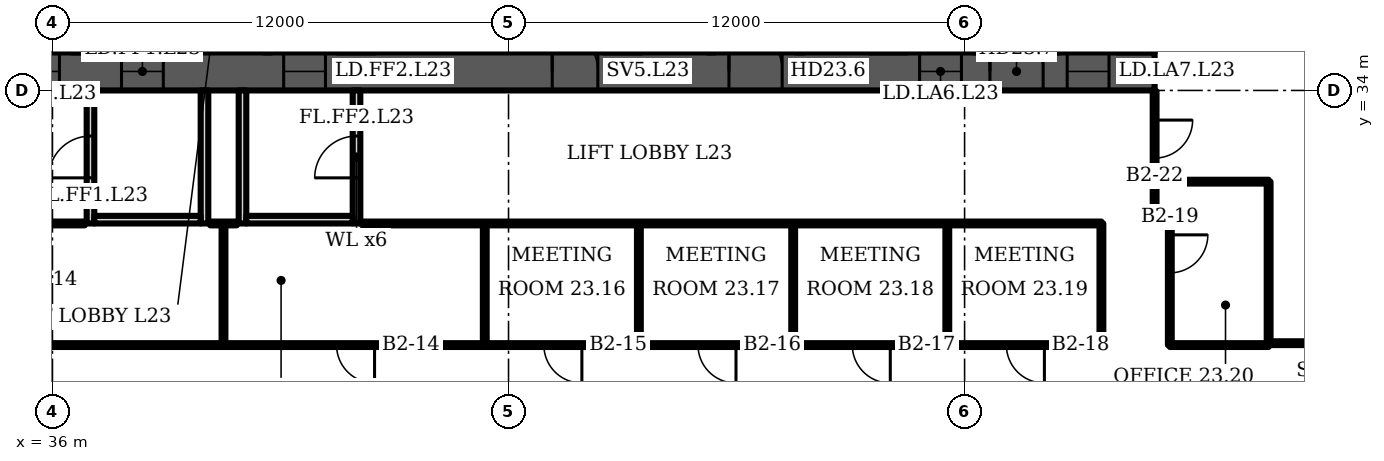
"""IFC4 building model, lengths in metres.
Left out: names, types, materials, properties, quantities, classifications, styles, units other than length and angle.
Written with IfcOpenShell. Run it as: python <this file> out.ifc"""

import sys

from ifc_helpers import new_model, si_unit, direction, frame, frame_2d, origin, place, context, subcontext, project, spatial, rectangle, extrude, element, fill, save


model = new_model("IFC4")
c1 = context("Model", 3, precision=1e-05, world=origin(), true_north=direction((0.0, 1.0)))
c2 = subcontext(c1, "Body", "Model", "MODEL_VIEW")
j1 = project(units=[si_unit("LENGTHUNIT", "METRE"), si_unit("PLANEANGLEUNIT", "RADIAN")], contexts=[c1])
p1 = place(None, origin())
s1 = spatial("IfcSite", under=j1, at=p1, CompositionType="ELEMENT")
p2 = place(p1, origin())
s2 = spatial("IfcBuilding", under=s1, at=p2, CompositionType="ELEMENT")
p3 = place(p2, frame((0.0, 0.0, 103.9)))
s3 = spatial("IfcBuildingStorey", under=s2, at=p3, CompositionType="ELEMENT", Elevation=103.9)
p4 = place(p3, frame((16.0, 34.5, 0.0), z_axis=(0.0, 0.0, 1.0), x_axis=(1.0, 0.0, 0.0)))
e1 = element("IfcWall", 1, at=p4, inside=s3, PredefinedType="SHEAR", context=c2, shape_type="SweptSolid", body=[
    extrude(rectangle(XDim=49.0, YDim=1.0, at=frame_2d((24.5, 0.0))), origin(), (0.0, 0.0, 1.0), 3.6),
])
p5 = place(p4, frame((1.2, 0.0, 0.0)))
e2 = element("IfcOpeningElement", 2, at=p5, cuts=e1, PredefinedType="OPENING", context=c2, shape_type="SweptSolid", body=[
    extrude(rectangle(XDim=1.1, YDim=2.1, at=frame_2d((0.55, 1.05))), frame((0.0, 0.51, 0.0), z_axis=(0.0, -1.0, 0.0), x_axis=(1.0, 0.0, 0.0)), (0.0, 0.0, 1.0), 1.02),
])
p6 = place(p4, frame((5.083, 0.0, 0.0)))
e3 = element("IfcOpeningElement", 3, at=p6, cuts=e1, PredefinedType="OPENING", context=c2, shape_type="SweptSolid", body=[
    extrude(rectangle(XDim=1.1, YDim=2.1, at=frame_2d((0.55, 1.05))), frame((0.0, 0.51, 0.0), z_axis=(0.0, -1.0, 0.0), x_axis=(1.0, 0.0, 0.0)), (0.0, 0.0, 1.0), 1.02),
])
p7 = place(p4, frame((2.933, 0.0, 0.0)))
e4 = element("IfcOpeningElement", 4, at=p7, cuts=e1, PredefinedType="OPENING", context=c2, shape_type="SweptSolid", body=[
    extrude(rectangle(XDim=1.4, YDim=2.1, at=frame_2d((0.7, 1.05))), frame((0.0, 0.51, 0.0), z_axis=(0.0, -1.0, 0.0), x_axis=(1.0, 0.0, 0.0)), (0.0, 0.0, 1.0), 1.02),
])
p8 = place(p4, frame((7.65, 0.0, 0.0)))
e5 = element("IfcOpeningElement", 5, at=p8, cuts=e1, PredefinedType="OPENING", context=c2, shape_type="SweptSolid", body=[
    extrude(rectangle(XDim=1.2, YDim=2.1, at=frame_2d((0.6, 1.05))), frame((0.0, 0.51, 0.0), z_axis=(0.0, -1.0, 0.0), x_axis=(1.0, 0.0, 0.0)), (0.0, 0.0, 1.0), 1.02),
])
p9 = place(p4, frame((14.817, 0.0, 0.0)))
e6 = element("IfcOpeningElement", 6, at=p9, cuts=e1, PredefinedType="OPENING", context=c2, shape_type="SweptSolid", body=[
    extrude(rectangle(XDim=1.1, YDim=2.1, at=frame_2d((0.55, 1.05))), frame((0.0, 0.51, 0.0), z_axis=(0.0, -1.0, 0.0), x_axis=(1.0, 0.0, 0.0)), (0.0, 0.0, 1.0), 1.02),
])
p10 = place(p4, frame((19.083, 0.0, 0.0)))
e7 = element("IfcOpeningElement", 7, at=p10, cuts=e1, PredefinedType="OPENING", context=c2, shape_type="SweptSolid", body=[
    extrude(rectangle(XDim=1.1, YDim=2.1, at=frame_2d((0.55, 1.05))), frame((0.0, 0.51, 0.0), z_axis=(0.0, -1.0, 0.0), x_axis=(1.0, 0.0, 0.0)), (0.0, 0.0, 1.0), 1.02),
])
p11 = place(p4, frame((16.8, 0.0, 0.0)))
e8 = element("IfcOpeningElement", 8, at=p11, cuts=e1, PredefinedType="OPENING", context=c2, shape_type="SweptSolid", body=[
    extrude(rectangle(XDim=1.4, YDim=2.1, at=frame_2d((0.7, 1.05))), frame((0.0, 0.51, 0.0), z_axis=(0.0, -1.0, 0.0), x_axis=(1.0, 0.0, 0.0)), (0.0, 0.0, 1.0), 1.02),
])
p12 = place(p4, frame((21.817, 0.0, 0.0)))
e9 = element("IfcOpeningElement", 9, at=p12, cuts=e1, PredefinedType="OPENING", context=c2, shape_type="SweptSolid", body=[
    extrude(rectangle(XDim=1.1, YDim=2.1, at=frame_2d((0.55, 1.05))), frame((0.0, 0.51, 0.0), z_axis=(0.0, -1.0, 0.0), x_axis=(1.0, 0.0, 0.0)), (0.0, 0.0, 1.0), 1.02),
])
p13 = place(p4, frame((26.083, 0.0, 0.0)))
e10 = element("IfcOpeningElement", 10, at=p13, cuts=e1, PredefinedType="OPENING", context=c2, shape_type="SweptSolid", body=[
    extrude(rectangle(XDim=1.1, YDim=2.1, at=frame_2d((0.55, 1.05))), frame((0.0, 0.51, 0.0), z_axis=(0.0, -1.0, 0.0), x_axis=(1.0, 0.0, 0.0)), (0.0, 0.0, 1.0), 1.02),
])
p14 = place(p4, frame((33.15, 0.0, 0.0)))
e11 = element("IfcOpeningElement", 11, at=p14, cuts=e1, PredefinedType="OPENING", context=c2, shape_type="SweptSolid", body=[
    extrude(rectangle(XDim=1.2, YDim=2.1, at=frame_2d((0.6, 1.05))), frame((0.0, 0.51, 0.0), z_axis=(0.0, -1.0, 0.0), x_axis=(1.0, 0.0, 0.0)), (0.0, 0.0, 1.0), 1.02),
])
p15 = place(p4, frame((37.8, 0.0, 0.0)))
e12 = element("IfcOpeningElement", 12, at=p15, cuts=e1, PredefinedType="OPENING", context=c2, shape_type="SweptSolid", body=[
    extrude(rectangle(XDim=1.4, YDim=2.1, at=frame_2d((0.7, 1.05))), frame((0.0, 0.51, 0.0), z_axis=(0.0, -1.0, 0.0), x_axis=(1.0, 0.0, 0.0)), (0.0, 0.0, 1.0), 1.02),
])
p16 = place(p4, frame((42.817, 0.0, 0.0)))
e13 = element("IfcOpeningElement", 13, at=p16, cuts=e1, PredefinedType="OPENING", context=c2, shape_type="SweptSolid", body=[
    extrude(rectangle(XDim=1.1, YDim=2.1, at=frame_2d((0.55, 1.05))), frame((0.0, 0.51, 0.0), z_axis=(0.0, -1.0, 0.0), x_axis=(1.0, 0.0, 0.0)), (0.0, 0.0, 1.0), 1.02),
])
p17 = place(p4, frame((46.7, 0.0, 0.0)))
e14 = element("IfcOpeningElement", 14, at=p17, cuts=e1, PredefinedType="OPENING", context=c2, shape_type="SweptSolid", body=[
    extrude(rectangle(XDim=1.1, YDim=2.1, at=frame_2d((0.55, 1.05))), frame((0.0, 0.51, 0.0), z_axis=(0.0, -1.0, 0.0), x_axis=(1.0, 0.0, 0.0)), (0.0, 0.0, 1.0), 1.02),
])
p18 = place(p4, frame((44.667, 0.0, 0.0)))
e15 = element("IfcOpeningElement", 15, at=p18, cuts=e1, PredefinedType="OPENING", context=c2, shape_type="SweptSolid", body=[
    extrude(rectangle(XDim=1.4, YDim=2.1, at=frame_2d((0.7, 1.05))), frame((0.0, 0.51, 0.0), z_axis=(0.0, -1.0, 0.0), x_axis=(1.0, 0.0, 0.0)), (0.0, 0.0, 1.0), 1.02),
])
p19 = place(p3, frame((37.0, 30.5, 0.0), z_axis=(0.0, 0.0, 1.0), x_axis=(0.0, 1.0, 0.0)))
e16 = element("IfcWall", 16, at=p19, inside=s3, PredefinedType="PARTITIONING", context=c2, shape_type="SweptSolid", body=[
    extrude(rectangle(XDim=3.5, YDim=0.2, at=frame_2d((1.75, 0.0))), origin(), (0.0, 0.0, 1.0), 3.2),
])
p20 = place(p19, frame((1.2, 0.0, 0.0)))
e17 = element("IfcOpeningElement", 17, at=p20, cuts=e16, PredefinedType="OPENING", context=c2, shape_type="SweptSolid", body=[
    extrude(rectangle(XDim=1.1, YDim=2.1, at=frame_2d((0.55, 1.05))), frame((0.0, 0.11, 0.0), z_axis=(0.0, -1.0, 0.0), x_axis=(1.0, 0.0, 0.0)), (0.0, 0.0, 1.0), 0.22),
])
p21 = place(p3, frame((40.0, 30.5, 0.0), z_axis=(0.0, 0.0, 1.0), x_axis=(0.0, 1.0, 0.0)))
e18 = element("IfcWall", 18, at=p21, inside=s3, PredefinedType="PARTITIONING", context=c2, shape_type="SweptSolid", body=[
    extrude(rectangle(XDim=3.5, YDim=0.2, at=frame_2d((1.75, 0.0))), origin(), (0.0, 0.0, 1.0), 3.2),
])
p22 = place(p3, frame((37.1, 30.6, 0.0), z_axis=(0.0, 0.0, 1.0), x_axis=(1.0, 0.0, 0.0)))
e19 = element("IfcWall", 19, at=p22, inside=s3, PredefinedType="PARTITIONING", context=c2, shape_type="SweptSolid", body=[
    extrude(rectangle(XDim=2.8, YDim=0.2, at=frame_2d((1.4, 0.0))), origin(), (0.0, 0.0, 1.0), 3.2),
])
p23 = place(p3, frame((41.0, 30.5, 0.0), z_axis=(0.0, 0.0, 1.0), x_axis=(0.0, 1.0, 0.0)))
e20 = element("IfcWall", 20, at=p23, inside=s3, PredefinedType="PARTITIONING", context=c2, shape_type="SweptSolid", body=[
    extrude(rectangle(XDim=3.5, YDim=0.2, at=frame_2d((1.75, 0.0))), origin(), (0.0, 0.0, 1.0), 3.2),
])
p24 = place(p3, frame((44.0, 30.5, 0.0), z_axis=(0.0, 0.0, 1.0), x_axis=(0.0, 1.0, 0.0)))
e21 = element("IfcWall", 21, at=p24, inside=s3, PredefinedType="PARTITIONING", context=c2, shape_type="SweptSolid", body=[
    extrude(rectangle(XDim=3.5, YDim=0.2, at=frame_2d((1.75, 0.0))), origin(), (0.0, 0.0, 1.0), 3.2),
])
p25 = place(p24, frame((1.2, 0.0, 0.0)))
e22 = element("IfcOpeningElement", 22, at=p25, cuts=e21, PredefinedType="OPENING", context=c2, shape_type="SweptSolid", body=[
    extrude(rectangle(XDim=1.1, YDim=2.1, at=frame_2d((0.55, 1.05))), frame((0.0, 0.11, 0.0), z_axis=(0.0, -1.0, 0.0), x_axis=(1.0, 0.0, 0.0)), (0.0, 0.0, 1.0), 0.22),
])
p26 = place(p3, frame((41.1, 30.6, 0.0), z_axis=(0.0, 0.0, 1.0), x_axis=(1.0, 0.0, 0.0)))
e23 = element("IfcWall", 23, at=p26, inside=s3, PredefinedType="PARTITIONING", context=c2, shape_type="SweptSolid", body=[
    extrude(rectangle(XDim=2.8, YDim=0.2, at=frame_2d((1.4, 0.0))), origin(), (0.0, 0.0, 1.0), 3.2),
])
p27 = place(p3, frame((16.0, 30.5, 0.0), z_axis=(0.0, 0.0, 1.0), x_axis=(1.0, 0.0, 0.0)))
e24 = element("IfcWall", 24, at=p27, inside=s3, PredefinedType="PARTITIONING", context=c2, shape_type="SweptSolid", body=[
    extrude(rectangle(XDim=20.85, YDim=0.1, at=frame_2d((10.425, 0.0))), origin(), (0.0, 0.0, 1.0), 3.2),
])
p28 = place(p27, frame((6.895, 0.0, 0.0)))
e25 = element("IfcOpeningElement", 25, at=p28, cuts=e24, PredefinedType="OPENING", context=c2, shape_type="SweptSolid", body=[
    extrude(rectangle(XDim=1.0, YDim=2.1, at=frame_2d((0.5, 1.05))), frame((0.0, 0.06, 0.0), z_axis=(0.0, -1.0, 0.0), x_axis=(1.0, 0.0, 0.0)), (0.0, 0.0, 1.0), 0.12),
])
p29 = place(p27, frame((15.37, 0.0, 0.0)))
e26 = element("IfcOpeningElement", 26, at=p29, cuts=e24, PredefinedType="OPENING", context=c2, shape_type="SweptSolid", body=[
    extrude(rectangle(XDim=1.0, YDim=2.1, at=frame_2d((0.5, 1.05))), frame((0.0, 0.06, 0.0), z_axis=(0.0, -1.0, 0.0), x_axis=(1.0, 0.0, 0.0)), (0.0, 0.0, 1.0), 0.12),
])
p30 = place(p3, frame((21.2, 27.3, 0.0), z_axis=(0.0, 0.0, 1.0), x_axis=(1.0, 0.0, 0.0)))
e27 = element("IfcWall", 27, at=p30, inside=s3, PredefinedType="PARTITIONING", context=c2, shape_type="SweptSolid", body=[
    extrude(rectangle(XDim=42.4, YDim=0.1, at=frame_2d((21.2, 0.0))), origin(), (0.0, 0.0, 1.0), 3.2),
])
p31 = place(p30, frame((22.275, 0.0, 0.0)))
e28 = element("IfcOpeningElement", 28, at=p31, cuts=e27, PredefinedType="OPENING", context=c2, shape_type="SweptSolid", body=[
    extrude(rectangle(XDim=1.0, YDim=2.1, at=frame_2d((0.5, 1.05))), frame((0.0, 0.06, 0.0), z_axis=(0.0, -1.0, 0.0), x_axis=(1.0, 0.0, 0.0)), (0.0, 0.0, 1.0), 0.12),
])
p32 = place(p30, frame((27.73, 0.0, 0.0)))
e29 = element("IfcOpeningElement", 29, at=p32, cuts=e27, PredefinedType="OPENING", context=c2, shape_type="SweptSolid", body=[
    extrude(rectangle(XDim=1.0, YDim=2.1, at=frame_2d((0.5, 1.05))), frame((0.0, 0.06, 0.0), z_axis=(0.0, -1.0, 0.0), x_axis=(1.0, 0.0, 0.0)), (0.0, 0.0, 1.0), 0.12),
])
p33 = place(p30, frame((31.785, 0.0, 0.0)))
e30 = element("IfcOpeningElement", 30, at=p33, cuts=e27, PredefinedType="OPENING", context=c2, shape_type="SweptSolid", body=[
    extrude(rectangle(XDim=1.0, YDim=2.1, at=frame_2d((0.5, 1.05))), frame((0.0, 0.06, 0.0), z_axis=(0.0, -1.0, 0.0), x_axis=(1.0, 0.0, 0.0)), (0.0, 0.0, 1.0), 0.12),
])
p34 = place(p30, frame((35.845, 0.0, 0.0)))
e31 = element("IfcOpeningElement", 31, at=p34, cuts=e27, PredefinedType="OPENING", context=c2, shape_type="SweptSolid", body=[
    extrude(rectangle(XDim=1.0, YDim=2.1, at=frame_2d((0.5, 1.05))), frame((0.0, 0.06, 0.0), z_axis=(0.0, -1.0, 0.0), x_axis=(1.0, 0.0, 0.0)), (0.0, 0.0, 1.0), 0.12),
])
p35 = place(p30, frame((39.9, 0.0, 0.0)))
e32 = element("IfcOpeningElement", 32, at=p35, cuts=e27, PredefinedType="OPENING", context=c2, shape_type="SweptSolid", body=[
    extrude(rectangle(XDim=1.0, YDim=2.1, at=frame_2d((0.5, 1.05))), frame((0.0, 0.06, 0.0), z_axis=(0.0, -1.0, 0.0), x_axis=(1.0, 0.0, 0.0)), (0.0, 0.0, 1.0), 0.12),
])
for number, where, z_axis, x_axis in (
    (33, (40.5, 27.3, 0.0), (0.0, 0.0, 1.0), (0.0, 1.0, 0.0)),
    (34, (47.375, 27.3, 0.0), (0.0, 0.0, 1.0), (0.0, 1.0, 0.0)),
    (35, (51.43, 27.3, 0.0), (0.0, 0.0, 1.0), (0.0, 1.0, 0.0)),
    (36, (55.49, 27.3, 0.0), (0.0, 0.0, 1.0), (0.0, 1.0, 0.0)),
    (37, (59.545, 27.3, 0.0), (0.0, 0.0, 1.0), (0.0, 1.0, 0.0)),
    (38, (63.6, 27.3, 0.0), (0.0, 0.0, 1.0), (0.0, 1.0, 0.0)),
):
    element("IfcWall", number, at=place(p3, frame(where, z_axis=z_axis, x_axis=x_axis)), inside=s3, PredefinedType="PARTITIONING", context=c2, shape_type="SweptSolid", body=[
        extrude(rectangle(XDim=3.2, YDim=0.1, at=frame_2d((1.6, 0.0))), origin(), (0.0, 0.0, 1.0), 3.2),
    ])
p36 = place(p3, frame((65.0, 30.56, 0.0), z_axis=(0.0, 0.0, 1.0), x_axis=(0.0, 1.0, 0.0)))
e39 = element("IfcWall", 39, at=p36, inside=s3, PredefinedType="PARTITIONING", context=c2, shape_type="SweptSolid", body=[
    extrude(rectangle(XDim=3.42, YDim=0.1, at=frame_2d((1.71, 0.0))), origin(), (0.0, 0.0, 1.0), 3.2),
])
p37 = place(p36, frame((1.66, 0.0, 0.0)))
e40 = element("IfcOpeningElement", 40, at=p37, cuts=e39, PredefinedType="OPENING", context=c2, shape_type="SweptSolid", body=[
    extrude(rectangle(XDim=1.0, YDim=2.1, at=frame_2d((0.5, 1.05))), frame((0.0, 0.06, 0.0), z_axis=(0.0, -1.0, 0.0), x_axis=(1.0, 0.0, 0.0)), (0.0, 0.0, 1.0), 0.12),
])
p38 = place(p3, frame((65.0, 31.6, 0.0), z_axis=(0.0, 0.0, 1.0), x_axis=(1.0, 0.0, 0.0)))
e41 = element("IfcWall", 41, at=p38, inside=s3, PredefinedType="PARTITIONING", context=c2, shape_type="SweptSolid", body=[
    extrude(rectangle(XDim=3.0, YDim=0.1, at=frame_2d((1.5, 0.0))), origin(), (0.0, 0.0, 1.0), 3.2),
])
p39 = place(p3, frame((65.395, 30.5, 0.0), z_axis=(0.0, 0.0, 1.0), x_axis=(-0.988637, 0.150312, 0.0)))
e42 = element("IfcWall", 42, at=p39, inside=s3, PredefinedType="PARTITIONING", context=c2, shape_type="SweptSolid", body=[
    extrude(rectangle(XDim=0.4, YDim=0.1, at=frame_2d((0.2, 0.0))), origin(), (0.0, 0.0, 1.0), 3.2),
])
p40 = place(p3, frame((65.4, 27.3, 0.0), z_axis=(0.0, 0.0, 1.0), x_axis=(0.0, 1.0, 0.0)))
e43 = element("IfcWall", 43, at=p40, inside=s3, PredefinedType="PARTITIONING", context=c2, shape_type="SweptSolid", body=[
    extrude(rectangle(XDim=3.2, YDim=0.1, at=frame_2d((1.6, 0.0))), origin(), (0.0, 0.0, 1.0), 3.2),
])
p41 = place(p40, frame((1.9, 0.0, 0.0)))
e44 = element("IfcOpeningElement", 44, at=p41, cuts=e43, PredefinedType="OPENING", context=c2, shape_type="SweptSolid", body=[
    extrude(rectangle(XDim=1.0, YDim=2.1, at=frame_2d((0.5, 1.05))), frame((0.0, 0.06, 0.0), z_axis=(0.0, -1.0, 0.0), x_axis=(1.0, 0.0, 0.0)), (0.0, 0.0, 1.0), 0.12),
])
p42 = place(p3, frame((65.4, 27.3, 0.0), z_axis=(0.0, 0.0, 1.0), x_axis=(1.0, 0.0, 0.0)))
e45 = element("IfcWall", 45, at=p42, inside=s3, PredefinedType="PARTITIONING", context=c2, shape_type="SweptSolid", body=[
    extrude(rectangle(XDim=2.6, YDim=0.1, at=frame_2d((1.3, 0.0))), origin(), (0.0, 0.0, 1.0), 3.2),
])
p43 = place(p3, frame((68.0, 27.3, 0.0), z_axis=(0.0, 0.0, 1.0), x_axis=(0.0, 1.0, 0.0)))
e46 = element("IfcWall", 46, at=p43, inside=s3, PredefinedType="PARTITIONING", context=c2, shape_type="SweptSolid", body=[
    extrude(rectangle(XDim=4.3, YDim=0.1, at=frame_2d((2.15, 0.0))), origin(), (0.0, 0.0, 1.0), 3.2),
])
p44 = place(p3, frame((68.05, 27.35, 0.0), z_axis=(0.0, 0.0, 1.0), x_axis=(1.0, 0.0, 0.0)))
e47 = element("IfcWall", 47, at=p44, inside=s3, PredefinedType="PARTITIONING", context=c2, shape_type="SweptSolid", body=[
    extrude(rectangle(XDim=1.62, YDim=0.1, at=frame_2d((0.81, 0.0))), origin(), (0.0, 0.0, 1.0), 3.2),
])
p45 = place(p3, frame((40.15, 30.5, 0.0), z_axis=(0.0, 0.0, 1.0), x_axis=(1.0, 0.0, 0.0)))
e48 = element("IfcWall", 48, at=p45, inside=s3, PredefinedType="PARTITIONING", context=c2, shape_type="SweptSolid", body=[
    extrude(rectangle(XDim=0.7, YDim=0.1, at=frame_2d((0.35, 0.0))), origin(), (0.0, 0.0, 1.0), 3.2),
])
p46 = place(p3, frame((44.15, 30.5, 0.0), z_axis=(0.0, 0.0, 1.0), x_axis=(1.0, 0.0, 0.0)))
e49 = element("IfcWall", 49, at=p46, inside=s3, PredefinedType="PARTITIONING", context=c2, shape_type="SweptSolid", body=[
    extrude(rectangle(XDim=19.45, YDim=0.1, at=frame_2d((9.725, 0.0))), origin(), (0.0, 0.0, 1.0), 3.2),
])
p47 = place(p10, origin())
e50 = element("IfcDoor", 50, at=p47, inside=s3, OperationType="DOUBLE_DOOR_SLIDING", PredefinedType="DOOR", context=c2, shape_type="SweptSolid", body=[
    extrude(rectangle(XDim=1.1, YDim=2.1, at=frame_2d((0.55, 1.05))), frame((0.0, 0.025, 0.0), z_axis=(0.0, -1.0, 0.0), x_axis=(1.0, 0.0, 0.0)), (0.0, 0.0, 1.0), 0.05),
])
fill(e7, e50)
p48 = place(p12, origin())
e51 = element("IfcDoor", 51, at=p48, inside=s3, OperationType="DOUBLE_DOOR_SLIDING", PredefinedType="DOOR", context=c2, shape_type="SweptSolid", body=[
    extrude(rectangle(XDim=1.1, YDim=2.1, at=frame_2d((0.55, 1.05))), frame((0.0, 0.025, 0.0), z_axis=(0.0, -1.0, 0.0), x_axis=(1.0, 0.0, 0.0)), (0.0, 0.0, 1.0), 0.05),
])
fill(e9, e51)
p49 = place(p13, origin())
e52 = element("IfcDoor", 52, at=p49, inside=s3, OperationType="DOUBLE_DOOR_SLIDING", PredefinedType="DOOR", context=c2, shape_type="SweptSolid", body=[
    extrude(rectangle(XDim=1.1, YDim=2.1, at=frame_2d((0.55, 1.05))), frame((0.0, 0.025, 0.0), z_axis=(0.0, -1.0, 0.0), x_axis=(1.0, 0.0, 0.0)), (0.0, 0.0, 1.0), 0.05),
])
fill(e10, e52)
p50 = place(p14, origin())
e53 = element("IfcDoor", 53, at=p50, inside=s3, OperationType="SINGLE_SWING_LEFT", PredefinedType="DOOR", context=c2, shape_type="SweptSolid", body=[
    extrude(rectangle(XDim=1.2, YDim=2.1, at=frame_2d((0.6, 1.05))), frame((0.0, 0.025, 0.0), z_axis=(0.0, -1.0, 0.0), x_axis=(1.0, 0.0, 0.0)), (0.0, 0.0, 1.0), 0.05),
])
fill(e11, e53)
p51 = place(p15, origin())
e54 = element("IfcDoor", 54, at=p51, inside=s3, OperationType="DOUBLE_DOOR_SINGLE_SWING", PredefinedType="DOOR", context=c2, shape_type="SweptSolid", body=[
    extrude(rectangle(XDim=1.4, YDim=2.1, at=frame_2d((0.7, 1.05))), frame((0.0, 0.025, 0.0), z_axis=(0.0, -1.0, 0.0), x_axis=(1.0, 0.0, 0.0)), (0.0, 0.0, 1.0), 0.05),
])
fill(e12, e54)
p52 = place(p16, origin())
e55 = element("IfcDoor", 55, at=p52, inside=s3, OperationType="DOUBLE_DOOR_SLIDING", PredefinedType="DOOR", context=c2, shape_type="SweptSolid", body=[
    extrude(rectangle(XDim=1.1, YDim=2.1, at=frame_2d((0.55, 1.05))), frame((0.0, 0.025, 0.0), z_axis=(0.0, -1.0, 0.0), x_axis=(1.0, 0.0, 0.0)), (0.0, 0.0, 1.0), 0.05),
])
fill(e13, e55)
p53 = place(p17, origin())
e56 = element("IfcDoor", 56, at=p53, inside=s3, OperationType="DOUBLE_DOOR_SLIDING", PredefinedType="DOOR", context=c2, shape_type="SweptSolid", body=[
    extrude(rectangle(XDim=1.1, YDim=2.1, at=frame_2d((0.55, 1.05))), frame((0.0, 0.025, 0.0), z_axis=(0.0, -1.0, 0.0), x_axis=(1.0, 0.0, 0.0)), (0.0, 0.0, 1.0), 0.05),
])
fill(e14, e56)
p54 = place(p18, origin())
e57 = element("IfcDoor", 57, at=p54, inside=s3, OperationType="DOUBLE_DOOR_SINGLE_SWING", PredefinedType="DOOR", context=c2, shape_type="SweptSolid", body=[
    extrude(rectangle(XDim=1.4, YDim=2.1, at=frame_2d((0.7, 1.05))), frame((0.0, 0.025, 0.0), z_axis=(0.0, -1.0, 0.0), x_axis=(1.0, 0.0, 0.0)), (0.0, 0.0, 1.0), 0.05),
])
fill(e15, e57)
p55 = place(p20, origin())
e58 = element("IfcDoor", 58, at=p55, inside=s3, OperationType="SINGLE_SWING_LEFT", PredefinedType="DOOR", context=c2, shape_type="SweptSolid", body=[
    extrude(rectangle(XDim=1.1, YDim=2.1, at=frame_2d((0.55, 1.05))), frame((0.0, 0.025, 0.0), z_axis=(0.0, -1.0, 0.0), x_axis=(1.0, 0.0, 0.0)), (0.0, 0.0, 1.0), 0.05),
])
fill(e17, e58)
p56 = place(p25, origin())
e59 = element("IfcDoor", 59, at=p56, inside=s3, OperationType="SINGLE_SWING_LEFT", PredefinedType="DOOR", context=c2, shape_type="SweptSolid", body=[
    extrude(rectangle(XDim=1.1, YDim=2.1, at=frame_2d((0.55, 1.05))), frame((0.0, 0.025, 0.0), z_axis=(0.0, -1.0, 0.0), x_axis=(1.0, 0.0, 0.0)), (0.0, 0.0, 1.0), 0.05),
])
fill(e22, e59)
p57 = place(p31, origin())
e60 = element("IfcDoor", 60, at=p57, inside=s3, OperationType="SINGLE_SWING_RIGHT", PredefinedType="DOOR", context=c2, shape_type="SweptSolid", body=[
    extrude(rectangle(XDim=1.0, YDim=2.1, at=frame_2d((0.5, 1.05))), frame((0.0, 0.025, 0.0), z_axis=(0.0, -1.0, 0.0), x_axis=(1.0, 0.0, 0.0)), (0.0, 0.0, 1.0), 0.05),
])
fill(e28, e60)
p58 = place(p32, origin())
e61 = element("IfcDoor", 61, at=p58, inside=s3, OperationType="SINGLE_SWING_RIGHT", PredefinedType="DOOR", context=c2, shape_type="SweptSolid", body=[
    extrude(rectangle(XDim=1.0, YDim=2.1, at=frame_2d((0.5, 1.05))), frame((0.0, 0.025, 0.0), z_axis=(0.0, -1.0, 0.0), x_axis=(1.0, 0.0, 0.0)), (0.0, 0.0, 1.0), 0.05),
])
fill(e29, e61)
p59 = place(p33, origin())
e62 = element("IfcDoor", 62, at=p59, inside=s3, OperationType="SINGLE_SWING_RIGHT", PredefinedType="DOOR", context=c2, shape_type="SweptSolid", body=[
    extrude(rectangle(XDim=1.0, YDim=2.1, at=frame_2d((0.5, 1.05))), frame((0.0, 0.025, 0.0), z_axis=(0.0, -1.0, 0.0), x_axis=(1.0, 0.0, 0.0)), (0.0, 0.0, 1.0), 0.05),
])
fill(e30, e62)
p60 = place(p34, origin())
e63 = element("IfcDoor", 63, at=p60, inside=s3, OperationType="SINGLE_SWING_RIGHT", PredefinedType="DOOR", context=c2, shape_type="SweptSolid", body=[
    extrude(rectangle(XDim=1.0, YDim=2.1, at=frame_2d((0.5, 1.05))), frame((0.0, 0.025, 0.0), z_axis=(0.0, -1.0, 0.0), x_axis=(1.0, 0.0, 0.0)), (0.0, 0.0, 1.0), 0.05),
])
fill(e31, e63)
p61 = place(p35, origin())
e64 = element("IfcDoor", 64, at=p61, inside=s3, OperationType="SINGLE_SWING_RIGHT", PredefinedType="DOOR", context=c2, shape_type="SweptSolid", body=[
    extrude(rectangle(XDim=1.0, YDim=2.1, at=frame_2d((0.5, 1.05))), frame((0.0, 0.025, 0.0), z_axis=(0.0, -1.0, 0.0), x_axis=(1.0, 0.0, 0.0)), (0.0, 0.0, 1.0), 0.05),
])
fill(e32, e64)
p62 = place(p41, origin())
e65 = element("IfcDoor", 65, at=p62, inside=s3, OperationType="SINGLE_SWING_RIGHT", PredefinedType="DOOR", context=c2, shape_type="SweptSolid", body=[
    extrude(rectangle(XDim=1.0, YDim=2.1, at=frame_2d((0.5, 1.05))), frame((0.0, 0.025, 0.0), z_axis=(0.0, -1.0, 0.0), x_axis=(1.0, 0.0, 0.0)), (0.0, 0.0, 1.0), 0.05),
])
fill(e44, e65)
p63 = place(p37, origin())
e66 = element("IfcDoor", 66, at=p63, inside=s3, OperationType="SINGLE_SWING_RIGHT", PredefinedType="DOOR", context=c2, shape_type="SweptSolid", body=[
    extrude(rectangle(XDim=1.0, YDim=2.1, at=frame_2d((0.5, 1.05))), frame((0.0, 0.025, 0.0), z_axis=(0.0, -1.0, 0.0), x_axis=(1.0, 0.0, 0.0)), (0.0, 0.0, 1.0), 0.05),
])
fill(e40, e66)
save(model, sys.argv[1])
